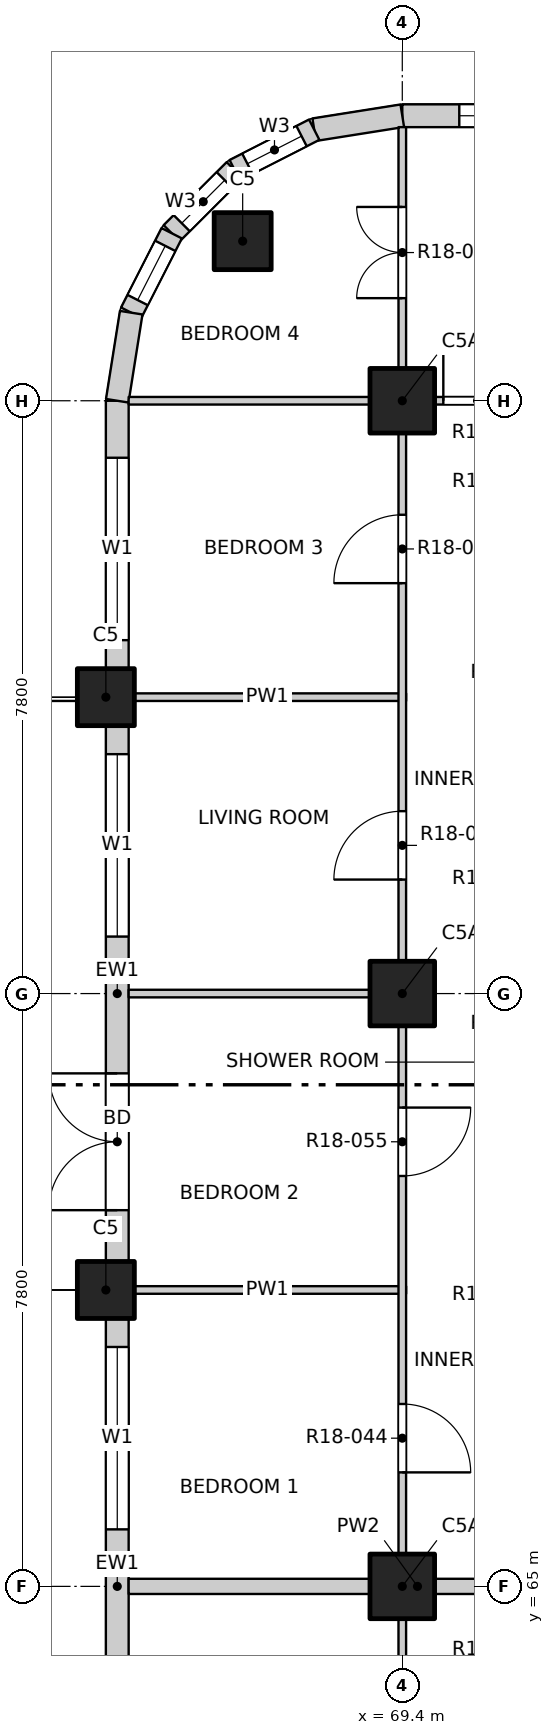
"""IFC4 building model, lengths in metres.
Left out: names, types, materials, properties, quantities, classifications, styles, units other than length and angle.
Written with IfcOpenShell. Run it as: python <this file> out.ifc"""

import sys

from ifc_helpers import new_model, si_unit, direction, frame, frame_2d, origin, origin_2d, place, context, subcontext, project, spatial, rectangle, extrude, element, fill, save


model = new_model("IFC4")
c1 = context("Model", 3, precision=1e-05, world=origin(), true_north=direction((0.0, 1.0)))
c2 = subcontext(c1, "Body", "Model", "MODEL_VIEW")
j1 = project(units=[si_unit("LENGTHUNIT", "METRE"), si_unit("PLANEANGLEUNIT", "RADIAN")], contexts=[c1])
p1 = place(None, origin())
s1 = spatial("IfcSite", under=j1, at=p1, CompositionType="ELEMENT")
p2 = place(p1, origin())
s2 = spatial("IfcBuilding", under=s1, at=p2, CompositionType="ELEMENT")
p3 = place(p2, frame((0.0, 0.0, 189.4)))
s3 = spatial("IfcBuildingStorey", under=s2, at=p3, CompositionType="ELEMENT", Elevation=189.4)
for number, where, z_axis, x_axis in (
    (1, (67.3, 82.7, -0.25), (0.0, 0.0, 1.0), (1.0, 0.0, 0.0)),
    (2, (65.5, 68.9, -0.25), (0.0, 0.0, 1.0), (1.0, 0.0, 0.0)),
    (3, (65.5, 76.7, -0.25), (0.0, 0.0, 1.0), (1.0, 0.0, 0.0)),
):
    element("IfcColumn", number, at=place(p3, frame(where, z_axis=z_axis, x_axis=x_axis)), inside=s3, PredefinedType="COLUMN", context=c2, shape_type="SweptSolid", body=[
        extrude(rectangle(XDim=0.75, YDim=0.75, at=origin_2d()), origin(), (0.0, 0.0, 1.0), 3.35),
    ])
for number, where, z_axis, x_axis in (
    (4, (69.4, 65.0, -0.25), (0.0, 0.0, 1.0), (1.0, 0.0, 0.0)),
    (5, (69.4, 72.8, -0.25), (0.0, 0.0, 1.0), (1.0, 0.0, 0.0)),
    (6, (69.4, 80.6, -0.25), (0.0, 0.0, 1.0), (1.0, 0.0, 0.0)),
):
    element("IfcColumn", number, at=place(p3, frame(where, z_axis=z_axis, x_axis=x_axis)), inside=s3, PredefinedType="COLUMN", context=c2, shape_type="SweptSolid", body=[
        extrude(rectangle(XDim=0.85, YDim=0.85, at=origin_2d()), origin(), (0.0, 0.0, 1.0), 3.35),
    ])
p4 = place(p3, frame((69.4, 84.35, 0.0), z_axis=(0.0, 0.0, 1.0), x_axis=(1.0, 0.0, 0.0)))
e7 = element("IfcWall", 7, at=p4, inside=s3, PredefinedType="SOLIDWALL", context=c2, shape_type="SweptSolid", body=[
    extrude(rectangle(XDim=3.525, YDim=0.3, at=frame_2d((1.763, 0.0))), origin(), (0.0, 0.0, 1.0), 3.1),
])
p5 = place(p4, frame((0.75, 0.0, 0.9)))
e8 = element("IfcOpeningElement", 8, at=p5, cuts=e7, PredefinedType="OPENING", context=c2, shape_type="SweptSolid", body=[
    extrude(rectangle(XDim=2.4, YDim=1.8, at=frame_2d((1.2, 0.9))), frame((0.0, 0.16, 0.0), z_axis=(0.0, -1.0, 0.0), x_axis=(1.0, 0.0, 0.0)), (0.0, 0.0, 1.0), 0.32),
])
p6 = place(p3, frame((65.65, 61.475, 0.0), z_axis=(0.0, 0.0, 1.0), x_axis=(0.0, 1.0, 0.0)))
e9 = element("IfcWall", 9, at=p6, inside=s3, PredefinedType="SOLIDWALL", context=c2, shape_type="SweptSolid", body=[
    extrude(rectangle(XDim=7.05, YDim=0.3, at=frame_2d((3.525, 0.0))), origin(), (0.0, 0.0, 1.0), 3.1),
])
p7 = place(p6, frame((0.675, 0.0, 0.0)))
e10 = element("IfcOpeningElement", 10, at=p7, cuts=e9, PredefinedType="OPENING", context=c2, shape_type="SweptSolid", body=[
    extrude(rectangle(XDim=1.8, YDim=2.4, at=frame_2d((0.9, 1.2))), frame((0.0, 0.16, 0.0), z_axis=(0.0, -1.0, 0.0), x_axis=(1.0, 0.0, 0.0)), (0.0, 0.0, 1.0), 0.32),
])
p8 = place(p6, frame((4.275, 0.0, 0.9)))
e11 = element("IfcOpeningElement", 11, at=p8, cuts=e9, PredefinedType="OPENING", context=c2, shape_type="SweptSolid", body=[
    extrude(rectangle(XDim=2.4, YDim=1.8, at=frame_2d((1.2, 0.9))), frame((0.0, 0.16, 0.0), z_axis=(0.0, -1.0, 0.0), x_axis=(1.0, 0.0, 0.0)), (0.0, 0.0, 1.0), 0.32),
])
p9 = place(p3, frame((65.65, 69.275, 0.0), z_axis=(0.0, 0.0, 1.0), x_axis=(0.0, 1.0, 0.0)))
e12 = element("IfcWall", 12, at=p9, inside=s3, PredefinedType="SOLIDWALL", context=c2, shape_type="SweptSolid", body=[
    extrude(rectangle(XDim=7.05, YDim=0.3, at=frame_2d((3.525, 0.0))), origin(), (0.0, 0.0, 1.0), 3.1),
])
p10 = place(p9, frame((0.675, 0.0, 0.0)))
e13 = element("IfcOpeningElement", 13, at=p10, cuts=e12, PredefinedType="OPENING", context=c2, shape_type="SweptSolid", body=[
    extrude(rectangle(XDim=1.8, YDim=2.4, at=frame_2d((0.9, 1.2))), frame((0.0, 0.16, 0.0), z_axis=(0.0, -1.0, 0.0), x_axis=(1.0, 0.0, 0.0)), (0.0, 0.0, 1.0), 0.32),
])
p11 = place(p9, frame((4.275, 0.0, 0.9)))
e14 = element("IfcOpeningElement", 14, at=p11, cuts=e12, PredefinedType="OPENING", context=c2, shape_type="SweptSolid", body=[
    extrude(rectangle(XDim=2.4, YDim=1.8, at=frame_2d((1.2, 0.9))), frame((0.0, 0.16, 0.0), z_axis=(0.0, -1.0, 0.0), x_axis=(1.0, 0.0, 0.0)), (0.0, 0.0, 1.0), 0.32),
])
p12 = place(p3, frame((65.65, 77.075, 0.0), z_axis=(0.0, 0.0, 1.0), x_axis=(0.0, 1.0, 0.0)))
e15 = element("IfcWall", 15, at=p12, inside=s3, PredefinedType="SOLIDWALL", context=c2, shape_type="SweptSolid", body=[
    extrude(rectangle(XDim=3.525, YDim=0.3, at=frame_2d((1.763, 0.0))), origin(), (0.0, 0.0, 1.0), 3.1),
])
p13 = place(p12, frame((0.375, 0.0, 0.9)))
e16 = element("IfcOpeningElement", 16, at=p13, cuts=e15, PredefinedType="OPENING", context=c2, shape_type="SweptSolid", body=[
    extrude(rectangle(XDim=2.4, YDim=1.8, at=frame_2d((1.2, 0.9))), frame((0.0, 0.16, 0.0), z_axis=(0.0, -1.0, 0.0), x_axis=(1.0, 0.0, 0.0)), (0.0, 0.0, 1.0), 0.32),
])
p14 = place(p3, frame((69.4, 84.35, 0.0), z_axis=(0.0, 0.0, 1.0), x_axis=(-0.987678452879, -0.156496880861, 0.0)))
e17 = element("IfcWall", 17, at=p14, inside=s3, PredefinedType="SOLIDWALL", context=c2, shape_type="SweptSolid", body=[
    extrude(rectangle(XDim=1.173, YDim=0.3, at=frame_2d((0.586, 0.0))), origin(), (0.0, 0.0, 1.0), 3.1),
])
p15 = place(p3, frame((68.241, 84.167, 0.0), z_axis=(0.0, 0.0, 1.0), x_axis=(-0.890988677504, -0.454025524128, 0.0)))
e18 = element("IfcWall", 18, at=p15, inside=s3, PredefinedType="SOLIDWALL", context=c2, shape_type="SweptSolid", body=[
    extrude(rectangle(XDim=1.173, YDim=0.3, at=frame_2d((0.587, 0.0))), origin(), (0.0, 0.0, 1.0), 3.1),
])
p16 = place(p15, frame((0.187, 0.0, 0.9)))
e19 = element("IfcOpeningElement", 19, at=p16, cuts=e18, PredefinedType="OPENING", context=c2, shape_type="SweptSolid", body=[
    extrude(rectangle(XDim=0.8, YDim=1.2, at=frame_2d((0.4, 0.6))), frame((0.0, 0.16, 0.0), z_axis=(0.0, -1.0, 0.0), x_axis=(1.0, 0.0, 0.0)), (0.0, 0.0, 1.0), 0.32),
])
p17 = place(p3, frame((67.196, 83.634, 0.0), z_axis=(0.0, 0.0, 1.0), x_axis=(-0.707106781187, -0.707106781187, 0.0)))
e20 = element("IfcWall", 20, at=p17, inside=s3, PredefinedType="SOLIDWALL", context=c2, shape_type="SweptSolid", body=[
    extrude(rectangle(XDim=1.173, YDim=0.3, at=frame_2d((0.586, 0.0))), origin(), (0.0, 0.0, 1.0), 3.1),
])
p18 = place(p17, frame((0.187, 0.0, 0.9)))
e21 = element("IfcOpeningElement", 21, at=p18, cuts=e20, PredefinedType="OPENING", context=c2, shape_type="SweptSolid", body=[
    extrude(rectangle(XDim=0.8, YDim=1.2, at=frame_2d((0.4, 0.6))), frame((0.0, 0.16, 0.0), z_axis=(0.0, -1.0, 0.0), x_axis=(1.0, 0.0, 0.0)), (0.0, 0.0, 1.0), 0.32),
])
p19 = place(p3, frame((66.366, 82.804, 0.0), z_axis=(0.0, 0.0, 1.0), x_axis=(-0.454025524128, -0.890988677504, 0.0)))
e22 = element("IfcWall", 22, at=p19, inside=s3, PredefinedType="SOLIDWALL", context=c2, shape_type="SweptSolid", body=[
    extrude(rectangle(XDim=1.173, YDim=0.3, at=frame_2d((0.587, 0.0))), origin(), (0.0, 0.0, 1.0), 3.1),
])
p20 = place(p19, frame((0.187, 0.0, 0.9)))
e23 = element("IfcOpeningElement", 23, at=p20, cuts=e22, PredefinedType="OPENING", context=c2, shape_type="SweptSolid", body=[
    extrude(rectangle(XDim=0.8, YDim=1.2, at=frame_2d((0.4, 0.6))), frame((0.0, 0.16, 0.0), z_axis=(0.0, -1.0, 0.0), x_axis=(1.0, 0.0, 0.0)), (0.0, 0.0, 1.0), 0.32),
])
p21 = place(p3, frame((65.833, 81.759, 0.0), z_axis=(0.0, 0.0, 1.0), x_axis=(-0.156496880861, -0.987678452879, 0.0)))
e24 = element("IfcWall", 24, at=p21, inside=s3, PredefinedType="SOLIDWALL", context=c2, shape_type="SweptSolid", body=[
    extrude(rectangle(XDim=1.173, YDim=0.3, at=frame_2d((0.586, 0.0))), origin(), (0.0, 0.0, 1.0), 3.1),
])
p22 = place(p3, frame((65.8, 65.0, 0.0), z_axis=(0.0, 0.0, 1.0), x_axis=(1.0, 0.0, 0.0)))
e25 = element("IfcWall", 25, at=p22, inside=s3, PredefinedType="PARTITIONING", context=c2, shape_type="SweptSolid", body=[
    extrude(rectangle(XDim=7.6, YDim=0.2, at=frame_2d((3.8, 0.0))), origin(), (0.0, 0.0, 1.0), 3.1),
])
for number, where, z_axis, x_axis in (
    (26, (65.8, 68.9, 0.0), (0.0, 0.0, 1.0), (1.0, 0.0, 0.0)),
    (27, (65.8, 72.8, 0.0), (0.0, 0.0, 1.0), (1.0, 0.0, 0.0)),
    (28, (65.8, 76.7, 0.0), (0.0, 0.0, 1.0), (1.0, 0.0, 0.0)),
):
    element("IfcWall", number, at=place(p3, frame(where, z_axis=z_axis, x_axis=x_axis)), inside=s3, PredefinedType="PARTITIONING", context=c2, shape_type="SweptSolid", body=[
        extrude(rectangle(XDim=3.65, YDim=0.1, at=frame_2d((1.825, 0.0))), origin(), (0.0, 0.0, 1.0), 3.1),
    ])
p23 = place(p3, frame((65.8, 80.6, 0.0), z_axis=(0.0, 0.0, 1.0), x_axis=(1.0, 0.0, 0.0)))
e29 = element("IfcWall", 29, at=p23, inside=s3, PredefinedType="PARTITIONING", context=c2, shape_type="SweptSolid", body=[
    extrude(rectangle(XDim=7.6, YDim=0.1, at=frame_2d((3.8, 0.0))), origin(), (0.0, 0.0, 1.0), 3.1),
])
p24 = place(p23, frame((4.14, 0.0, 0.0)))
e30 = element("IfcOpeningElement", 30, at=p24, cuts=e29, PredefinedType="OPENING", context=c2, shape_type="SweptSolid", body=[
    extrude(rectangle(XDim=0.9, YDim=2.1, at=frame_2d((0.45, 1.05))), frame((0.0, 0.06, 0.0), z_axis=(0.0, -1.0, 0.0), x_axis=(1.0, 0.0, 0.0)), (0.0, 0.0, 1.0), 0.12),
])
p25 = place(p3, frame((69.4, 45.8, 0.0), z_axis=(0.0, 0.0, 1.0), x_axis=(0.0, 1.0, 0.0)))
e31 = element("IfcWall", 31, at=p25, inside=s3, PredefinedType="PARTITIONING", context=c2, shape_type="SweptSolid", body=[
    extrude(rectangle(XDim=38.4, YDim=0.1, at=frame_2d((19.2, 0.0))), origin(), (0.0, 0.0, 1.0), 3.1),
])
p26 = place(p25, frame((1.05, 0.0, 0.0)))
e32 = element("IfcOpeningElement", 32, at=p26, cuts=e31, PredefinedType="OPENING", context=c2, shape_type="SweptSolid", body=[
    extrude(rectangle(XDim=1.2, YDim=2.1, at=frame_2d((0.6, 1.05))), frame((0.0, 0.06, 0.0), z_axis=(0.0, -1.0, 0.0), x_axis=(1.0, 0.0, 0.0)), (0.0, 0.0, 1.0), 0.12),
])
p27 = place(p25, frame((5.1, 0.0, 0.0)))
e33 = element("IfcOpeningElement", 33, at=p27, cuts=e31, PredefinedType="OPENING", context=c2, shape_type="SweptSolid", body=[
    extrude(rectangle(XDim=0.9, YDim=2.1, at=frame_2d((0.45, 1.05))), frame((0.0, 0.06, 0.0), z_axis=(0.0, -1.0, 0.0), x_axis=(1.0, 0.0, 0.0)), (0.0, 0.0, 1.0), 0.12),
])
p28 = place(p25, frame((9.0, 0.0, 0.0)))
e34 = element("IfcOpeningElement", 34, at=p28, cuts=e31, PredefinedType="OPENING", context=c2, shape_type="SweptSolid", body=[
    extrude(rectangle(XDim=0.9, YDim=2.1, at=frame_2d((0.45, 1.05))), frame((0.0, 0.06, 0.0), z_axis=(0.0, -1.0, 0.0), x_axis=(1.0, 0.0, 0.0)), (0.0, 0.0, 1.0), 0.12),
])
p29 = place(p25, frame((12.9, 0.0, 0.0)))
e35 = element("IfcOpeningElement", 35, at=p29, cuts=e31, PredefinedType="OPENING", context=c2, shape_type="SweptSolid", body=[
    extrude(rectangle(XDim=0.9, YDim=2.1, at=frame_2d((0.45, 1.05))), frame((0.0, 0.06, 0.0), z_axis=(0.0, -1.0, 0.0), x_axis=(1.0, 0.0, 0.0)), (0.0, 0.0, 1.0), 0.12),
])
p30 = place(p25, frame((16.8, 0.0, 0.0)))
e36 = element("IfcOpeningElement", 36, at=p30, cuts=e31, PredefinedType="OPENING", context=c2, shape_type="SweptSolid", body=[
    extrude(rectangle(XDim=0.9, YDim=2.1, at=frame_2d((0.45, 1.05))), frame((0.0, 0.06, 0.0), z_axis=(0.0, -1.0, 0.0), x_axis=(1.0, 0.0, 0.0)), (0.0, 0.0, 1.0), 0.12),
])
p31 = place(p25, frame((20.7, 0.0, 0.0)))
e37 = element("IfcOpeningElement", 37, at=p31, cuts=e31, PredefinedType="OPENING", context=c2, shape_type="SweptSolid", body=[
    extrude(rectangle(XDim=0.9, YDim=2.1, at=frame_2d((0.45, 1.05))), frame((0.0, 0.06, 0.0), z_axis=(0.0, -1.0, 0.0), x_axis=(1.0, 0.0, 0.0)), (0.0, 0.0, 1.0), 0.12),
])
p32 = place(p25, frame((24.6, 0.0, 0.0)))
e38 = element("IfcOpeningElement", 38, at=p32, cuts=e31, PredefinedType="OPENING", context=c2, shape_type="SweptSolid", body=[
    extrude(rectangle(XDim=0.9, YDim=2.1, at=frame_2d((0.45, 1.05))), frame((0.0, 0.06, 0.0), z_axis=(0.0, -1.0, 0.0), x_axis=(1.0, 0.0, 0.0)), (0.0, 0.0, 1.0), 0.12),
])
p33 = place(p25, frame((28.5, 0.0, 0.0)))
e39 = element("IfcOpeningElement", 39, at=p33, cuts=e31, PredefinedType="OPENING", context=c2, shape_type="SweptSolid", body=[
    extrude(rectangle(XDim=0.9, YDim=2.1, at=frame_2d((0.45, 1.05))), frame((0.0, 0.06, 0.0), z_axis=(0.0, -1.0, 0.0), x_axis=(1.0, 0.0, 0.0)), (0.0, 0.0, 1.0), 0.12),
])
p34 = place(p25, frame((32.4, 0.0, 0.0)))
e40 = element("IfcOpeningElement", 40, at=p34, cuts=e31, PredefinedType="OPENING", context=c2, shape_type="SweptSolid", body=[
    extrude(rectangle(XDim=0.9, YDim=2.1, at=frame_2d((0.45, 1.05))), frame((0.0, 0.06, 0.0), z_axis=(0.0, -1.0, 0.0), x_axis=(1.0, 0.0, 0.0)), (0.0, 0.0, 1.0), 0.12),
])
p35 = place(p25, frame((36.15, 0.0, 0.0)))
e41 = element("IfcOpeningElement", 41, at=p35, cuts=e31, PredefinedType="OPENING", context=c2, shape_type="SweptSolid", body=[
    extrude(rectangle(XDim=1.2, YDim=2.1, at=frame_2d((0.6, 1.05))), frame((0.0, 0.06, 0.0), z_axis=(0.0, -1.0, 0.0), x_axis=(1.0, 0.0, 0.0)), (0.0, 0.0, 1.0), 0.12),
])
p36 = place(p5, origin())
e42 = element("IfcWindow", 42, at=p36, inside=s3, PartitioningType="DOUBLE_PANEL_VERTICAL", PredefinedType="WINDOW", context=c2, shape_type="SweptSolid", body=[
    extrude(rectangle(XDim=2.4, YDim=1.8, at=frame_2d((1.2, 0.9))), frame((0.0, 0.03, 0.0), z_axis=(0.0, -1.0, 0.0), x_axis=(1.0, 0.0, 0.0)), (0.0, 0.0, 1.0), 0.06),
])
fill(e8, e42)
p37 = place(p8, origin())
e43 = element("IfcWindow", 43, at=p37, inside=s3, PartitioningType="DOUBLE_PANEL_VERTICAL", PredefinedType="WINDOW", context=c2, shape_type="SweptSolid", body=[
    extrude(rectangle(XDim=2.4, YDim=1.8, at=frame_2d((1.2, 0.9))), frame((0.0, 0.03, 0.0), z_axis=(0.0, -1.0, 0.0), x_axis=(1.0, 0.0, 0.0)), (0.0, 0.0, 1.0), 0.06),
])
fill(e11, e43)
p38 = place(p10, origin())
e44 = element("IfcDoor", 44, at=p38, inside=s3, OperationType="DOUBLE_DOOR_SINGLE_SWING", PredefinedType="DOOR", context=c2, shape_type="SweptSolid", body=[
    extrude(rectangle(XDim=1.8, YDim=2.4, at=frame_2d((0.9, 1.2))), frame((0.0, 0.025, 0.0), z_axis=(0.0, -1.0, 0.0), x_axis=(1.0, 0.0, 0.0)), (0.0, 0.0, 1.0), 0.05),
])
fill(e13, e44)
p39 = place(p11, origin())
e45 = element("IfcWindow", 45, at=p39, inside=s3, PartitioningType="DOUBLE_PANEL_VERTICAL", PredefinedType="WINDOW", context=c2, shape_type="SweptSolid", body=[
    extrude(rectangle(XDim=2.4, YDim=1.8, at=frame_2d((1.2, 0.9))), frame((0.0, 0.03, 0.0), z_axis=(0.0, -1.0, 0.0), x_axis=(1.0, 0.0, 0.0)), (0.0, 0.0, 1.0), 0.06),
])
fill(e14, e45)
p40 = place(p13, origin())
e46 = element("IfcWindow", 46, at=p40, inside=s3, PartitioningType="DOUBLE_PANEL_VERTICAL", PredefinedType="WINDOW", context=c2, shape_type="SweptSolid", body=[
    extrude(rectangle(XDim=2.4, YDim=1.8, at=frame_2d((1.2, 0.9))), frame((0.0, 0.03, 0.0), z_axis=(0.0, -1.0, 0.0), x_axis=(1.0, 0.0, 0.0)), (0.0, 0.0, 1.0), 0.06),
])
fill(e16, e46)
p41 = place(p16, origin())
e47 = element("IfcWindow", 47, at=p41, inside=s3, PartitioningType="SINGLE_PANEL", PredefinedType="WINDOW", context=c2, shape_type="SweptSolid", body=[
    extrude(rectangle(XDim=0.8, YDim=1.2, at=frame_2d((0.4, 0.6))), frame((0.0, 0.03, 0.0), z_axis=(0.0, -1.0, 0.0), x_axis=(1.0, 0.0, 0.0)), (0.0, 0.0, 1.0), 0.06),
])
fill(e19, e47)
p42 = place(p18, origin())
e48 = element("IfcWindow", 48, at=p42, inside=s3, PartitioningType="SINGLE_PANEL", PredefinedType="WINDOW", context=c2, shape_type="SweptSolid", body=[
    extrude(rectangle(XDim=0.8, YDim=1.2, at=frame_2d((0.4, 0.6))), frame((0.0, 0.03, 0.0), z_axis=(0.0, -1.0, 0.0), x_axis=(1.0, 0.0, 0.0)), (0.0, 0.0, 1.0), 0.06),
])
fill(e21, e48)
p43 = place(p20, origin())
e49 = element("IfcWindow", 49, at=p43, inside=s3, PartitioningType="SINGLE_PANEL", PredefinedType="WINDOW", context=c2, shape_type="SweptSolid", body=[
    extrude(rectangle(XDim=0.8, YDim=1.2, at=frame_2d((0.4, 0.6))), frame((0.0, 0.03, 0.0), z_axis=(0.0, -1.0, 0.0), x_axis=(1.0, 0.0, 0.0)), (0.0, 0.0, 1.0), 0.06),
])
fill(e23, e49)
p44 = place(p31, origin())
e50 = element("IfcDoor", 50, at=p44, inside=s3, OperationType="SINGLE_SWING_RIGHT", PredefinedType="DOOR", context=c2, shape_type="SweptSolid", body=[
    extrude(rectangle(XDim=0.9, YDim=2.1, at=frame_2d((0.45, 1.05))), frame((0.0, 0.025, 0.0), z_axis=(0.0, -1.0, 0.0), x_axis=(1.0, 0.0, 0.0)), (0.0, 0.0, 1.0), 0.05),
])
fill(e37, e50)
p45 = place(p32, origin())
e51 = element("IfcDoor", 51, at=p45, inside=s3, OperationType="SINGLE_SWING_LEFT", PredefinedType="DOOR", context=c2, shape_type="SweptSolid", body=[
    extrude(rectangle(XDim=0.9, YDim=2.1, at=frame_2d((0.45, 1.05))), frame((0.0, 0.025, 0.0), z_axis=(0.0, -1.0, 0.0), x_axis=(1.0, 0.0, 0.0)), (0.0, 0.0, 1.0), 0.05),
])
fill(e38, e51)
p46 = place(p33, origin())
e52 = element("IfcDoor", 52, at=p46, inside=s3, OperationType="SINGLE_SWING_LEFT", PredefinedType="DOOR", context=c2, shape_type="SweptSolid", body=[
    extrude(rectangle(XDim=0.9, YDim=2.1, at=frame_2d((0.45, 1.05))), frame((0.0, 0.025, 0.0), z_axis=(0.0, -1.0, 0.0), x_axis=(1.0, 0.0, 0.0)), (0.0, 0.0, 1.0), 0.05),
])
fill(e39, e52)
p47 = place(p34, origin())
e53 = element("IfcDoor", 53, at=p47, inside=s3, OperationType="SINGLE_SWING_LEFT", PredefinedType="DOOR", context=c2, shape_type="SweptSolid", body=[
    extrude(rectangle(XDim=0.9, YDim=2.1, at=frame_2d((0.45, 1.05))), frame((0.0, 0.025, 0.0), z_axis=(0.0, -1.0, 0.0), x_axis=(1.0, 0.0, 0.0)), (0.0, 0.0, 1.0), 0.05),
])
fill(e40, e53)
p48 = place(p24, origin())
e54 = element("IfcDoor", 54, at=p48, inside=s3, OperationType="SINGLE_SWING_LEFT", PredefinedType="DOOR", context=c2, shape_type="SweptSolid", body=[
    extrude(rectangle(XDim=0.9, YDim=2.1, at=frame_2d((0.45, 1.05))), frame((0.0, 0.025, 0.0), z_axis=(0.0, -1.0, 0.0), x_axis=(1.0, 0.0, 0.0)), (0.0, 0.0, 1.0), 0.05),
])
fill(e30, e54)
p49 = place(p35, origin())
e55 = element("IfcDoor", 55, at=p49, inside=s3, OperationType="DOUBLE_DOOR_SINGLE_SWING", PredefinedType="DOOR", context=c2, shape_type="SweptSolid", body=[
    extrude(rectangle(XDim=1.2, YDim=2.1, at=frame_2d((0.6, 1.05))), frame((0.0, 0.025, 0.0), z_axis=(0.0, -1.0, 0.0), x_axis=(1.0, 0.0, 0.0)), (0.0, 0.0, 1.0), 0.05),
])
fill(e41, e55)
save(model, sys.argv[1])
